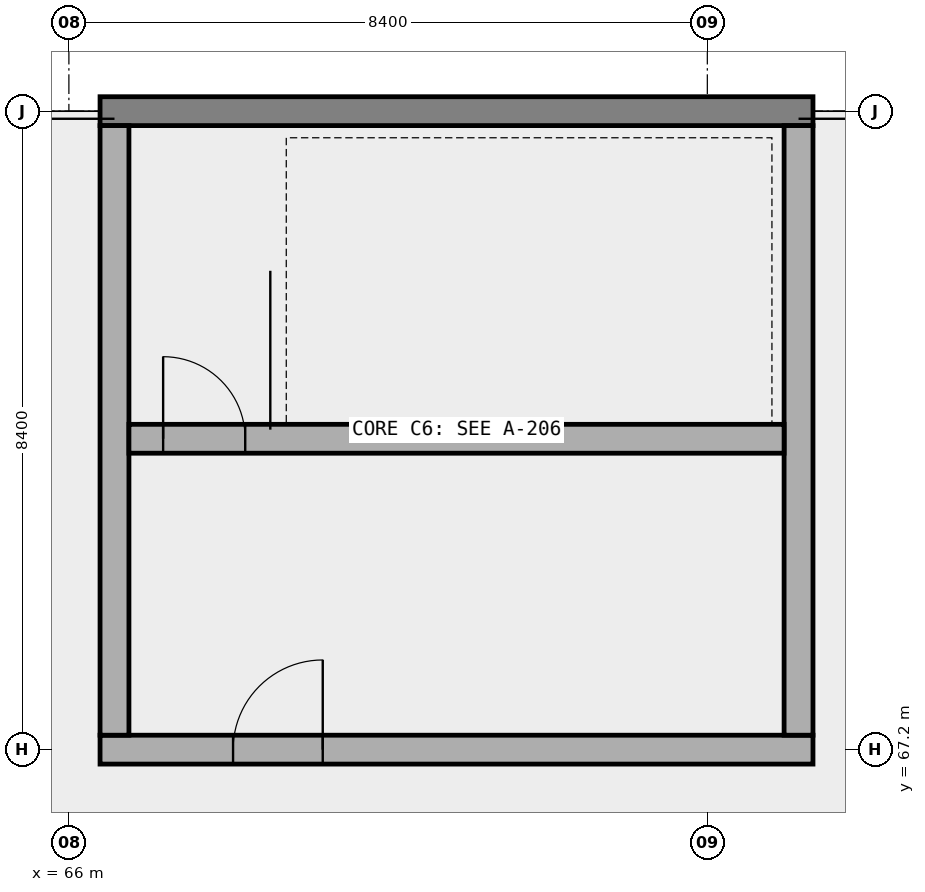
"""IFC4 building model, lengths in metres.
Left out: names, types, materials, properties, quantities, classifications, styles, units other than length and angle.
Written with IfcOpenShell. Run it as: python <this file> out.ifc"""

import sys

from ifc_helpers import new_model, si_unit, direction, frame, frame_2d, origin, place, context, subcontext, project, spatial, rectangle, extrude, element, fill, save


model = new_model("IFC4")
c1 = context("Model", 3, precision=1e-05, world=origin(), true_north=direction((0.0, 1.0)))
c2 = subcontext(c1, "Body", "Model", "MODEL_VIEW")
j1 = project(units=[si_unit("LENGTHUNIT", "METRE"), si_unit("PLANEANGLEUNIT", "RADIAN")], contexts=[c1])
p1 = place(None, origin())
s1 = spatial("IfcSite", under=j1, at=p1, CompositionType="ELEMENT")
p2 = place(p1, origin())
s2 = spatial("IfcBuilding", under=s1, at=p2, CompositionType="ELEMENT")
p3 = place(p2, frame((0.0, 0.0, 10.5)))
s3 = spatial("IfcBuildingStorey", under=s2, at=p3, CompositionType="ELEMENT", Elevation=10.5)
p4 = place(p3, frame((66.41, 67.2, 0.0), z_axis=(0.0, 0.0, 1.0), x_axis=(1.0, 0.0, 0.0)))
e1 = element("IfcWall", 1, at=p4, inside=s3, PredefinedType="SHEAR", context=c2, shape_type="SweptSolid", body=[
    extrude(rectangle(XDim=9.38, YDim=0.38, at=frame_2d((4.69, 0.0))), origin(), (0.0, 0.0, 1.0), 5.1),
])
p5 = place(p4, frame((1.75, 0.0, 0.0)))
e2 = element("IfcOpeningElement", 2, at=p5, cuts=e1, PredefinedType="OPENING", context=c2, shape_type="SweptSolid", body=[
    extrude(rectangle(XDim=1.18, YDim=2.24, at=frame_2d((0.59, 1.12))), frame((0.0, 0.2, 0.0), z_axis=(0.0, -1.0, 0.0), x_axis=(1.0, 0.0, 0.0)), (0.0, 0.0, 1.0), 0.4),
])
p6 = place(p3, frame((66.41, 75.6, 0.0), z_axis=(0.0, 0.0, 1.0), x_axis=(1.0, 0.0, 0.0)))
e3 = element("IfcWall", 3, at=p6, inside=s3, PredefinedType="SHEAR", context=c2, shape_type="SweptSolid", body=[
    extrude(rectangle(XDim=9.38, YDim=0.38, at=frame_2d((4.69, 0.0))), origin(), (0.0, 0.0, 1.0), 5.1),
])
for number, where, z_axis, x_axis in (
    (4, (66.6, 67.39, 0.0), (0.0, 0.0, 1.0), (0.0, 1.0, 0.0)),
    (5, (75.6, 67.39, 0.0), (0.0, 0.0, 1.0), (0.0, 1.0, 0.0)),
):
    element("IfcWall", number, at=place(p3, frame(where, z_axis=z_axis, x_axis=x_axis)), inside=s3, PredefinedType="SHEAR", context=c2, shape_type="SweptSolid", body=[
        extrude(rectangle(XDim=8.02, YDim=0.38, at=frame_2d((4.01, 0.0))), origin(), (0.0, 0.0, 1.0), 5.1),
    ])
p7 = place(p3, frame((66.79, 71.29, 0.0), z_axis=(0.0, 0.0, 1.0), x_axis=(1.0, 0.0, 0.0)))
e6 = element("IfcWall", 6, at=p7, inside=s3, PredefinedType="SHEAR", context=c2, shape_type="SweptSolid", body=[
    extrude(rectangle(XDim=8.62, YDim=0.38, at=frame_2d((4.31, 0.0))), origin(), (0.0, 0.0, 1.0), 5.1),
])
p8 = place(p7, frame((0.45, 0.0, 0.0)))
e7 = element("IfcOpeningElement", 7, at=p8, cuts=e6, PredefinedType="OPENING", context=c2, shape_type="SweptSolid", body=[
    extrude(rectangle(XDim=1.08, YDim=2.18, at=frame_2d((0.54, 1.09))), frame((0.0, 0.2, 0.0), z_axis=(0.0, -1.0, 0.0), x_axis=(1.0, 0.0, 0.0)), (0.0, 0.0, 1.0), 0.4),
])
p9 = place(p8, origin())
e8 = element("IfcDoor", 8, at=p9, inside=s3, OperationType="SINGLE_SWING_LEFT", PredefinedType="DOOR", context=c2, shape_type="SweptSolid", body=[
    extrude(rectangle(XDim=1.08, YDim=2.18, at=frame_2d((0.54, 1.09))), frame((0.0, 0.025, 0.0), z_axis=(0.0, -1.0, 0.0), x_axis=(1.0, 0.0, 0.0)), (0.0, 0.0, 1.0), 0.05),
])
fill(e7, e8)
p10 = place(p5, origin())
e9 = element("IfcDoor", 9, at=p10, inside=s3, OperationType="SINGLE_SWING_RIGHT", PredefinedType="DOOR", context=c2, shape_type="SweptSolid", body=[
    extrude(rectangle(XDim=1.18, YDim=2.24, at=frame_2d((0.59, 1.12))), frame((0.0, 0.025, 0.0), z_axis=(0.0, -1.0, 0.0), x_axis=(1.0, 0.0, 0.0)), (0.0, 0.0, 1.0), 0.05),
])
fill(e2, e9)
save(model, sys.argv[1])
